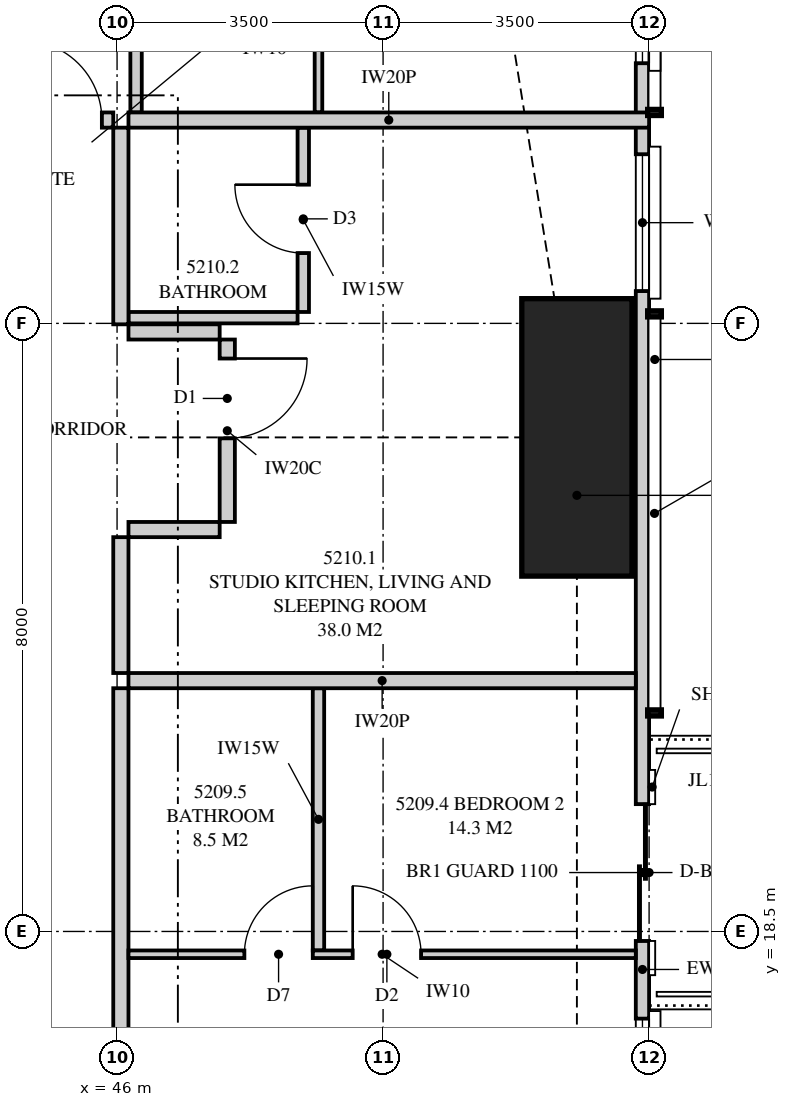
"""IFC4 building model, lengths in metres.
Left out: names, types, materials, properties, quantities, classifications, styles, units other than length and angle.
Written with IfcOpenShell. Run it as: python <this file> out.ifc"""

import sys

from ifc_helpers import new_model, si_unit, direction, frame, frame_2d, origin, origin_2d, place, context, subcontext, project, spatial, polyline, rectangle, outline, extrude, element, fill, save


model = new_model("IFC4")
c1 = context("Model", 3, precision=1e-05, world=origin(), true_north=direction((0.0, 1.0)))
c2 = subcontext(c1, "Body", "Model", "MODEL_VIEW")
j1 = project(units=[si_unit("LENGTHUNIT", "METRE"), si_unit("PLANEANGLEUNIT", "RADIAN")], contexts=[c1])
p1 = place(None, origin())
s1 = spatial("IfcSite", under=j1, at=p1, CompositionType="ELEMENT")
p2 = place(p1, origin())
s2 = spatial("IfcBuilding", under=s1, at=p2, CompositionType="ELEMENT")
p3 = place(p2, frame((0.0, 0.0, 191.2)))
s3 = spatial("IfcBuildingStorey", under=s2, at=p3, CompositionType="ELEMENT", Elevation=191.2)
p4 = place(p3, frame((52.05, 25.0, 0.0), z_axis=(0.0, 0.0, 1.0), x_axis=(1.0, 0.0, 0.0)))
e1 = element("IfcColumn", 1, at=p4, inside=s3, PredefinedType="COLUMN", context=c2, shape_type="SweptSolid", body=[
    extrude(rectangle(XDim=1.45, YDim=3.65, at=origin_2d()), origin(), (0.0, 0.0, 1.0), 3.35),
])
p5 = place(p3, frame((52.913, 3.051, 0.0), z_axis=(0.0, 0.0, 1.0), x_axis=(0.0, 1.0, 0.0)))
e2 = element("IfcWall", 2, at=p5, inside=s3, PredefinedType="SOLIDWALL", context=c2, shape_type="SweptSolid", body=[
    extrude(outline(polyline([(0.0, 0.0), (29.897, 0.0), (29.897, 3.11), (22.167, 3.11), (22.167, 2.15), (22.074, 2.15), (22.074, 3.11), (21.949, 3.11), (21.949, 2.15), (9.949, 2.15), (9.949, 3.11), (9.847, 3.11), (9.847, 2.15), (9.706, 2.15), (9.706, 3.11), (0.0, 3.11), (0.0, 0.0)])), frame((0.0, 0.087, 0.0), z_axis=(0.0, -1.0, 0.0), x_axis=(1.0, 0.0, 0.0)), (0.0, 0.0, 1.0), 0.175),
])
p6 = place(p5, frame((1.137, 0.0, 0.4)))
e3 = element("IfcOpeningElement", 3, at=p6, cuts=e2, PredefinedType="OPENING", context=c2, shape_type="SweptSolid", body=[
    extrude(rectangle(XDim=2.4, YDim=1.7, at=frame_2d((1.2, 0.85))), frame((0.0, 0.097, 0.0), z_axis=(0.0, -1.0, 0.0), x_axis=(1.0, 0.0, 0.0)), (0.0, 0.0, 1.0), 0.195),
])
p7 = place(p5, frame((5.674, 0.0, 0.4)))
e4 = element("IfcOpeningElement", 4, at=p7, cuts=e2, PredefinedType="OPENING", context=c2, shape_type="SweptSolid", body=[
    extrude(rectangle(XDim=1.8, YDim=1.7, at=frame_2d((0.9, 0.85))), frame((0.0, 0.097, 0.0), z_axis=(0.0, -1.0, 0.0), x_axis=(1.0, 0.0, 0.0)), (0.0, 0.0, 1.0), 0.195),
])
p8 = place(p5, frame((11.902, 0.0, 0.4)))
e5 = element("IfcOpeningElement", 5, at=p8, cuts=e2, PredefinedType="OPENING", context=c2, shape_type="SweptSolid", body=[
    extrude(rectangle(XDim=2.4, YDim=1.7, at=frame_2d((1.2, 0.85))), frame((0.0, 0.097, 0.0), z_axis=(0.0, -1.0, 0.0), x_axis=(1.0, 0.0, 0.0)), (0.0, 0.0, 1.0), 0.195),
])
p9 = place(p5, frame((15.324, 0.0, 0.0)))
e6 = element("IfcOpeningElement", 6, at=p9, cuts=e2, PredefinedType="OPENING", context=c2, shape_type="SweptSolid", body=[
    extrude(rectangle(XDim=1.8, YDim=2.1, at=frame_2d((0.9, 1.05))), frame((0.0, 0.097, 0.0), z_axis=(0.0, -1.0, 0.0), x_axis=(1.0, 0.0, 0.0)), (0.0, 0.0, 1.0), 0.195),
])
p10 = place(p5, frame((23.874, 0.0, 0.4)))
e7 = element("IfcOpeningElement", 7, at=p10, cuts=e2, PredefinedType="OPENING", context=c2, shape_type="SweptSolid", body=[
    extrude(rectangle(XDim=1.8, YDim=1.7, at=frame_2d((0.9, 0.85))), frame((0.0, 0.097, 0.0), z_axis=(0.0, -1.0, 0.0), x_axis=(1.0, 0.0, 0.0)), (0.0, 0.0, 1.0), 0.195),
])
p11 = place(p5, frame((26.871, 0.0, 0.4)))
e8 = element("IfcOpeningElement", 8, at=p11, cuts=e2, PredefinedType="OPENING", context=c2, shape_type="SweptSolid", body=[
    extrude(rectangle(XDim=1.8, YDim=1.7, at=frame_2d((0.9, 0.85))), frame((0.0, 0.097, 0.0), z_axis=(0.0, -1.0, 0.0), x_axis=(1.0, 0.0, 0.0)), (0.0, 0.0, 1.0), 0.195),
])
p12 = place(p3, frame((42.05, 29.175, 0.0), z_axis=(0.0, 0.0, 1.0), x_axis=(1.0, 0.0, 0.0)))
e9 = element("IfcWall", 9, at=p12, inside=s3, PredefinedType="PARTITIONING", context=c2, shape_type="SweptSolid", body=[
    extrude(outline(polyline([(0.0, 0.0), (3.9, 0.0), (3.9, 3.11), (1.037, 3.11), (1.037, 2.541), (0.363, 2.541), (0.363, 3.11), (0.0, 3.11), (0.0, 0.0)])), frame((0.0, 0.1, 0.0), z_axis=(0.0, -1.0, 0.0), x_axis=(1.0, 0.0, 0.0)), (0.0, 0.0, 1.0), 0.2),
])
p13 = place(p12, frame((2.7, 0.0, 0.0)))
e10 = element("IfcOpeningElement", 10, at=p13, cuts=e9, PredefinedType="OPENING", context=c2, shape_type="SweptSolid", body=[
    extrude(rectangle(XDim=1.05, YDim=2.2, at=frame_2d((0.525, 1.1))), frame((0.0, 0.11, 0.0), z_axis=(0.0, -1.0, 0.0), x_axis=(1.0, 0.0, 0.0)), (0.0, 0.0, 1.0), 0.22),
])
p14 = place(p3, frame((48.65, 32.345, 0.0), z_axis=(0.0, 0.0, 1.0), x_axis=(0.0, -1.0, 0.0)))
e11 = element("IfcWall", 11, at=p14, inside=s3, PredefinedType="PARTITIONING", context=c2, shape_type="SweptSolid", body=[
    extrude(rectangle(XDim=3.07, YDim=0.1, at=frame_2d((1.535, 0.0))), origin(), (0.0, 0.0, 1.0), 3.11),
])
p15 = place(p14, frame((1.048, 0.0, 0.0)))
e12 = element("IfcOpeningElement", 12, at=p15, cuts=e11, PredefinedType="OPENING", context=c2, shape_type="SweptSolid", body=[
    extrude(rectangle(XDim=0.9, YDim=2.1, at=frame_2d((0.45, 1.05))), frame((0.0, 0.06, 0.0), z_axis=(0.0, -1.0, 0.0), x_axis=(1.0, 0.0, 0.0)), (0.0, 0.0, 1.0), 0.12),
])
p16 = place(p3, frame((46.25, 32.345, 0.0), z_axis=(0.0, 0.0, 1.0), x_axis=(0.0, -1.0, 0.0)))
e13 = element("IfcWall", 13, at=p16, inside=s3, PredefinedType="PLUMBINGWALL", context=c2, shape_type="SweptSolid", body=[
    extrude(rectangle(XDim=3.07, YDim=0.15, at=frame_2d((1.535, 0.0))), origin(), (0.0, 0.0, 1.0), 3.11),
])
p17 = place(p3, frame((46.15, 29.175, 0.0), z_axis=(0.0, 0.0, 1.0), x_axis=(1.0, 0.0, 0.0)))
e14 = element("IfcWall", 14, at=p17, inside=s3, PredefinedType="PARTITIONING", context=c2, shape_type="SweptSolid", body=[
    extrude(outline(polyline([(0.0, 0.0), (6.85, 0.0), (6.85, 3.11), (6.147, 3.11), (6.147, 2.15), (4.303, 2.15), (4.303, 3.11), (0.0, 3.11), (0.0, 0.0)])), frame((0.0, 0.1, 0.0), z_axis=(0.0, -1.0, 0.0), x_axis=(1.0, 0.0, 0.0)), (0.0, 0.0, 1.0), 0.2),
])
p18 = place(p3, frame((52.825, 21.8, 0.0), z_axis=(0.0, 0.0, 1.0), x_axis=(-1.0, 0.0, 0.0)))
e15 = element("IfcWall", 15, at=p18, inside=s3, PredefinedType="PARTITIONING", context=c2, shape_type="SweptSolid", body=[
    extrude(outline(polyline([(0.0, 0.0), (6.675, 0.0), (6.675, 3.11), (1.685, 3.11), (1.685, 2.15), (0.0, 2.15), (0.0, 3.11), (0.0, 0.0)])), frame((0.0, 0.1, 0.0), z_axis=(0.0, -1.0, 0.0), x_axis=(1.0, 0.0, 0.0)), (0.0, 0.0, 1.0), 0.2),
])
p19 = place(p3, frame((46.05, 7.925, 0.0), z_axis=(0.0, 0.0, 1.0), x_axis=(0.0, 1.0, 0.0)))
e16 = element("IfcWall", 16, at=p19, inside=s3, PredefinedType="PARTITIONING", context=c2, shape_type="SweptSolid", body=[
    extrude(outline(polyline([(0.0, 0.0), (13.775, 0.0), (13.775, 3.11), (5.412, 3.11), (5.412, 2.541), (4.738, 2.541), (4.738, 3.11), (0.0, 3.11), (0.0, 0.0)])), frame((0.0, 0.1, 0.0), z_axis=(0.0, -1.0, 0.0), x_axis=(1.0, 0.0, 0.0)), (0.0, 0.0, 1.0), 0.2),
])
p20 = place(p19, frame((6.387, 0.0, 0.0)))
e17 = element("IfcOpeningElement", 17, at=p20, cuts=e16, PredefinedType="OPENING", context=c2, shape_type="SweptSolid", body=[
    extrude(rectangle(XDim=1.05, YDim=2.2, at=frame_2d((0.525, 1.1))), frame((0.0, 0.11, 0.0), z_axis=(0.0, -1.0, 0.0), x_axis=(1.0, 0.0, 0.0)), (0.0, 0.0, 1.0), 0.22),
])
p21 = place(p3, frame((52.825, 18.2, 0.0), z_axis=(0.0, 0.0, 1.0), x_axis=(-1.0, 0.0, 0.0)))
e18 = element("IfcWall", 18, at=p21, inside=s3, PredefinedType="PARTITIONING", context=c2, shape_type="SweptSolid", body=[
    extrude(outline(polyline([(0.0, 0.0), (6.675, 0.0), (6.675, 3.11), (1.635, 3.11), (1.635, 2.15), (0.0, 2.15), (0.0, 3.11), (0.0, 0.0)])), frame((0.0, 0.05, 0.0), z_axis=(0.0, -1.0, 0.0), x_axis=(1.0, 0.0, 0.0)), (0.0, 0.0, 1.0), 0.1),
])
p22 = place(p21, frame((2.825, 0.0, 0.0)))
e19 = element("IfcOpeningElement", 19, at=p22, cuts=e18, PredefinedType="OPENING", context=c2, shape_type="SweptSolid", body=[
    extrude(rectangle(XDim=0.9, YDim=2.1, at=frame_2d((0.45, 1.05))), frame((0.0, 0.06, 0.0), z_axis=(0.0, -1.0, 0.0), x_axis=(1.0, 0.0, 0.0)), (0.0, 0.0, 1.0), 0.12),
])
p23 = place(p21, frame((4.25, 0.0, 0.0)))
e20 = element("IfcOpeningElement", 20, at=p23, cuts=e18, PredefinedType="OPENING", context=c2, shape_type="SweptSolid", body=[
    extrude(rectangle(XDim=0.9, YDim=2.1, at=frame_2d((0.45, 1.05))), frame((0.0, 0.06, 0.0), z_axis=(0.0, -1.0, 0.0), x_axis=(1.0, 0.0, 0.0)), (0.0, 0.0, 1.0), 0.12),
])
p24 = place(p3, frame((48.65, 18.25, 0.0), z_axis=(0.0, 0.0, 1.0), x_axis=(0.0, 1.0, 0.0)))
e21 = element("IfcWall", 21, at=p24, inside=s3, PredefinedType="PLUMBINGWALL", context=c2, shape_type="SweptSolid", body=[
    extrude(rectangle(XDim=3.45, YDim=0.15, at=frame_2d((1.725, 0.0))), origin(), (0.0, 0.0, 1.0), 3.11),
])
p25 = place(p3, frame((46.05, 21.9, 0.0), z_axis=(0.0, 0.0, 1.0), x_axis=(0.0, 1.0, 0.0)))
e22 = element("IfcWall", 22, at=p25, inside=s3, PredefinedType="PARTITIONING", context=c2, shape_type="SweptSolid", body=[
    extrude(rectangle(XDim=1.788, YDim=0.2, at=frame_2d((0.894, 0.0))), origin(), (0.0, 0.0, 1.0), 3.11),
])
p26 = place(p3, frame((48.45, 26.65, 0.0), z_axis=(0.0, 0.0, 1.0), x_axis=(0.0, 1.0, 0.0)))
e23 = element("IfcWall", 23, at=p26, inside=s3, PredefinedType="PLUMBINGWALL", context=c2, shape_type="SweptSolid", body=[
    extrude(rectangle(XDim=2.425, YDim=0.15, at=frame_2d((1.212, 0.0))), origin(), (0.0, 0.0, 1.0), 3.11),
])
p27 = place(p26, frame((0.775, 0.0, 0.0)))
e24 = element("IfcOpeningElement", 24, at=p27, cuts=e23, PredefinedType="OPENING", context=c2, shape_type="SweptSolid", body=[
    extrude(rectangle(XDim=0.9, YDim=2.1, at=frame_2d((0.45, 1.05))), frame((0.0, 0.085, 0.0), z_axis=(0.0, -1.0, 0.0), x_axis=(1.0, 0.0, 0.0)), (0.0, 0.0, 1.0), 0.17),
])
p28 = place(p3, frame((48.375, 26.575, 0.0), z_axis=(0.0, 0.0, 1.0), x_axis=(-1.0, 0.0, 0.0)))
e25 = element("IfcWall", 25, at=p28, inside=s3, PredefinedType="PLUMBINGWALL", context=c2, shape_type="SweptSolid", body=[
    extrude(rectangle(XDim=2.225, YDim=0.15, at=frame_2d((1.113, 0.0))), origin(), (0.0, 0.0, 1.0), 3.11),
])
p29 = place(p3, frame((46.05, 26.488, 0.0), z_axis=(0.0, 0.0, 1.0), x_axis=(0.0, 1.0, 0.0)))
e26 = element("IfcWall", 26, at=p29, inside=s3, PredefinedType="PARTITIONING", context=c2, shape_type="SweptSolid", body=[
    extrude(rectangle(XDim=2.587, YDim=0.2, at=frame_2d((1.294, 0.0))), origin(), (0.0, 0.0, 1.0), 3.11),
])
p30 = place(p3, frame((47.45, 23.887, 0.0), z_axis=(0.0, 0.0, 1.0), x_axis=(0.0, 1.0, 0.0)))
e27 = element("IfcWall", 27, at=p30, inside=s3, PredefinedType="PARTITIONING", context=c2, shape_type="SweptSolid", body=[
    extrude(outline(polyline([(0.0, 0.0), (2.4, 0.0), (2.4, 3.11), (1.45, 3.11), (1.45, 2.541), (0.775, 2.541), (0.775, 3.11), (0.0, 3.11), (0.0, 0.0)])), frame((0.0, 0.1, 0.0), z_axis=(0.0, -1.0, 0.0), x_axis=(1.0, 0.0, 0.0)), (0.0, 0.0, 1.0), 0.2),
])
p31 = place(p30, frame((1.1, 0.0, 0.0)))
e28 = element("IfcOpeningElement", 28, at=p31, cuts=e27, PredefinedType="OPENING", context=c2, shape_type="SweptSolid", body=[
    extrude(rectangle(XDim=1.05, YDim=2.2, at=frame_2d((0.525, 1.1))), frame((0.0, 0.11, 0.0), z_axis=(0.0, -1.0, 0.0), x_axis=(1.0, 0.0, 0.0)), (0.0, 0.0, 1.0), 0.22),
])
for number, where, z_axis, x_axis in (
    (29, (46.15, 23.788, 0.0), (0.0, 0.0, 1.0), (1.0, 0.0, 0.0)),
    (30, (46.15, 26.387, 0.0), (0.0, 0.0, 1.0), (1.0, 0.0, 0.0)),
):
    element("IfcWall", number, at=place(p3, frame(where, z_axis=z_axis, x_axis=x_axis)), inside=s3, PredefinedType="PARTITIONING", context=c2, shape_type="SweptSolid", body=[
        extrude(rectangle(XDim=1.2, YDim=0.2, at=frame_2d((0.6, 0.0))), origin(), (0.0, 0.0, 1.0), 3.11),
    ])
p32 = place(p8, origin())
e31 = element("IfcWindow", 31, at=p32, inside=s3, PartitioningType="SINGLE_PANEL", PredefinedType="WINDOW", context=c2, shape_type="SweptSolid", body=[
    extrude(rectangle(XDim=2.4, YDim=1.7, at=frame_2d((1.2, 0.85))), frame((0.0, 0.03, 0.0), z_axis=(0.0, -1.0, 0.0), x_axis=(1.0, 0.0, 0.0)), (0.0, 0.0, 1.0), 0.06),
])
fill(e5, e31)
p33 = place(p9, origin())
e32 = element("IfcDoor", 32, at=p33, inside=s3, OperationType="SLIDING_TO_LEFT", PredefinedType="DOOR", context=c2, shape_type="SweptSolid", body=[
    extrude(rectangle(XDim=1.8, YDim=2.1, at=frame_2d((0.9, 1.05))), frame((0.0, 0.025, 0.0), z_axis=(0.0, -1.0, 0.0), x_axis=(1.0, 0.0, 0.0)), (0.0, 0.0, 1.0), 0.05),
])
fill(e6, e32)
p34 = place(p10, origin())
e33 = element("IfcWindow", 33, at=p34, inside=s3, PartitioningType="SINGLE_PANEL", PredefinedType="WINDOW", context=c2, shape_type="SweptSolid", body=[
    extrude(rectangle(XDim=1.8, YDim=1.7, at=frame_2d((0.9, 0.85))), frame((0.0, 0.03, 0.0), z_axis=(0.0, -1.0, 0.0), x_axis=(1.0, 0.0, 0.0)), (0.0, 0.0, 1.0), 0.06),
])
fill(e7, e33)
p35 = place(p11, origin())
e34 = element("IfcWindow", 34, at=p35, inside=s3, PartitioningType="SINGLE_PANEL", PredefinedType="WINDOW", context=c2, shape_type="SweptSolid", body=[
    extrude(rectangle(XDim=1.8, YDim=1.7, at=frame_2d((0.9, 0.85))), frame((0.0, 0.03, 0.0), z_axis=(0.0, -1.0, 0.0), x_axis=(1.0, 0.0, 0.0)), (0.0, 0.0, 1.0), 0.06),
])
fill(e8, e34)
p36 = place(p13, origin())
e35 = element("IfcDoor", 35, at=p36, inside=s3, OperationType="SINGLE_SWING_LEFT", PredefinedType="DOOR", context=c2, shape_type="SweptSolid", body=[
    extrude(rectangle(XDim=1.05, YDim=2.2, at=frame_2d((0.525, 1.1))), frame((0.0, 0.025, 0.0), z_axis=(0.0, -1.0, 0.0), x_axis=(1.0, 0.0, 0.0)), (0.0, 0.0, 1.0), 0.05),
])
fill(e10, e35)
p37 = place(p22, frame((0.9, 0.0, 0.0), z_axis=(0.0, 0.0, 1.0), x_axis=(-1.0, 0.0, 0.0)))
e36 = element("IfcDoor", 36, at=p37, inside=s3, OperationType="SINGLE_SWING_LEFT", PredefinedType="DOOR", context=c2, shape_type="SweptSolid", body=[
    extrude(rectangle(XDim=0.9, YDim=2.1, at=frame_2d((0.45, 1.05))), frame((0.0, 0.025, 0.0), z_axis=(0.0, -1.0, 0.0), x_axis=(1.0, 0.0, 0.0)), (0.0, 0.0, 1.0), 0.05),
])
fill(e19, e36)
p38 = place(p23, frame((0.9, 0.0, 0.0), z_axis=(0.0, 0.0, 1.0), x_axis=(-1.0, 0.0, 0.0)))
e37 = element("IfcDoor", 37, at=p38, inside=s3, OperationType="SINGLE_SWING_RIGHT", PredefinedType="DOOR", context=c2, shape_type="SweptSolid", body=[
    extrude(rectangle(XDim=0.9, YDim=2.1, at=frame_2d((0.45, 1.05))), frame((0.0, 0.025, 0.0), z_axis=(0.0, -1.0, 0.0), x_axis=(1.0, 0.0, 0.0)), (0.0, 0.0, 1.0), 0.05),
])
fill(e20, e37)
p39 = place(p31, frame((1.05, 0.0, 0.0), z_axis=(0.0, 0.0, 1.0), x_axis=(-1.0, 0.0, 0.0)))
e38 = element("IfcDoor", 38, at=p39, inside=s3, OperationType="SINGLE_SWING_LEFT", PredefinedType="DOOR", context=c2, shape_type="SweptSolid", body=[
    extrude(rectangle(XDim=1.05, YDim=2.2, at=frame_2d((0.525, 1.1))), frame((0.0, 0.025, 0.0), z_axis=(0.0, -1.0, 0.0), x_axis=(1.0, 0.0, 0.0)), (0.0, 0.0, 1.0), 0.05),
])
fill(e28, e38)
p40 = place(p27, origin())
e39 = element("IfcDoor", 39, at=p40, inside=s3, OperationType="SINGLE_SWING_RIGHT", PredefinedType="DOOR", context=c2, shape_type="SweptSolid", body=[
    extrude(rectangle(XDim=0.9, YDim=2.1, at=frame_2d((0.45, 1.05))), frame((0.0, 0.025, 0.0), z_axis=(0.0, -1.0, 0.0), x_axis=(1.0, 0.0, 0.0)), (0.0, 0.0, 1.0), 0.05),
])
fill(e24, e39)
save(model, sys.argv[1])
